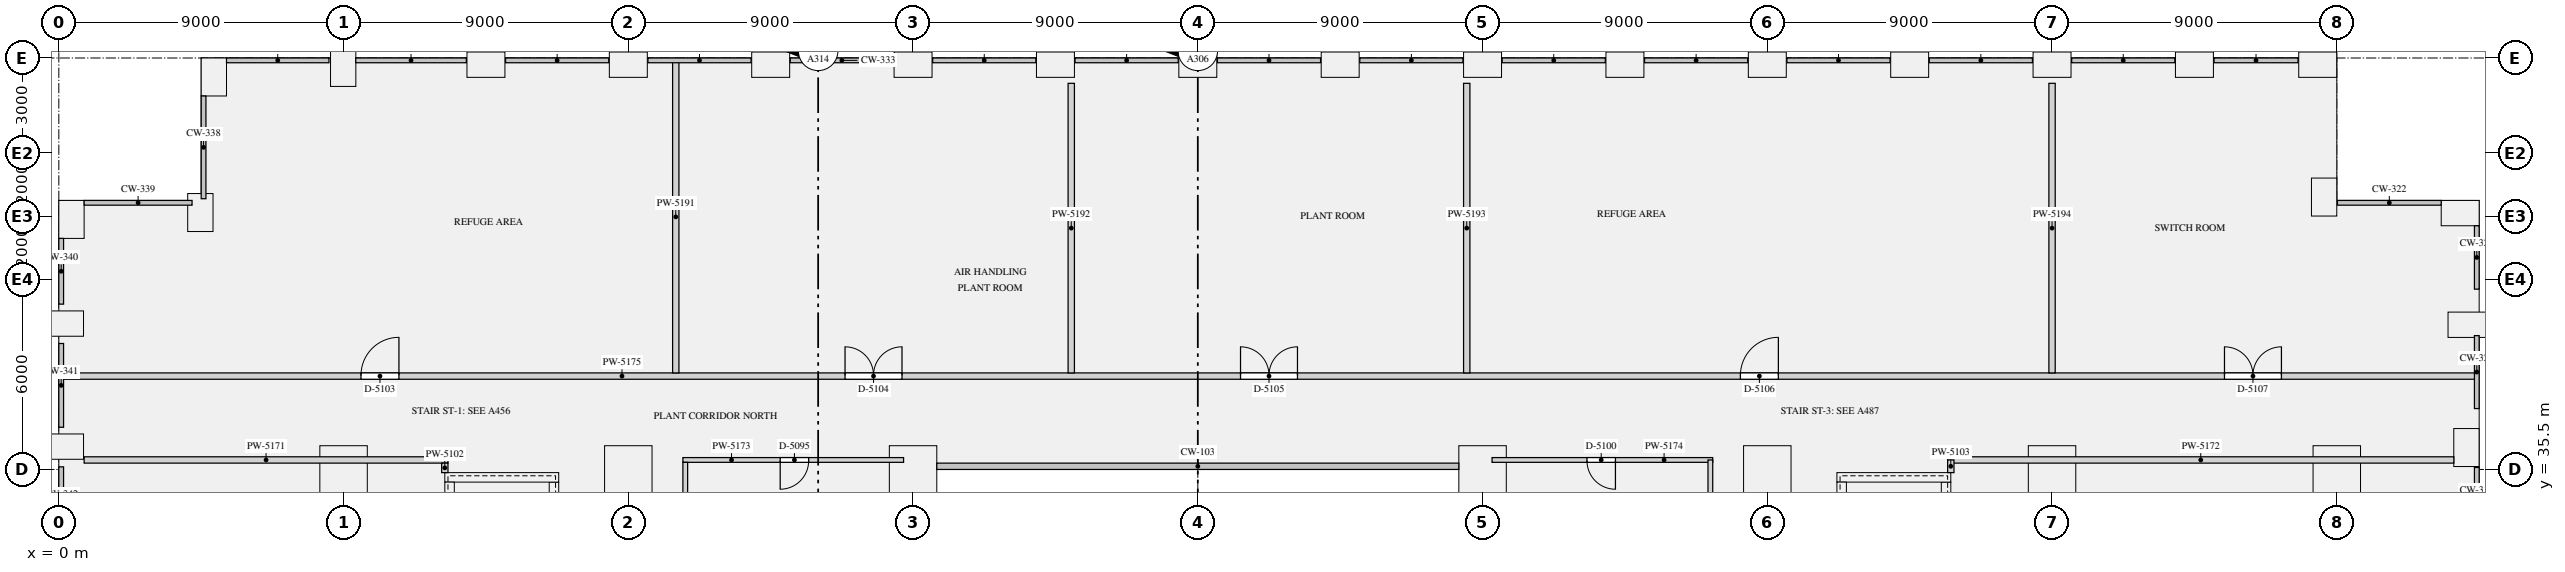
"""IFC4 building model, lengths in metres.
Left out: names, types, materials, properties, quantities, classifications, styles, units other than length and angle.
Written with IfcOpenShell. Run it as: python <this file> out.ifc"""

import sys

from ifc_helpers import new_model, si_unit, direction, frame, frame_2d, origin, origin_2d, place, context, subcontext, project, spatial, rectangle, extrude, element, fill, save


model = new_model("IFC4")
c1 = context("Model", 3, precision=1e-05, world=origin(), true_north=direction((0.0, 1.0)))
c2 = subcontext(c1, "Body", "Model", "MODEL_VIEW")
j1 = project(units=[si_unit("LENGTHUNIT", "METRE"), si_unit("PLANEANGLEUNIT", "RADIAN")], contexts=[c1])
p1 = place(None, origin())
s1 = spatial("IfcSite", under=j1, at=p1, CompositionType="ELEMENT")
p2 = place(p1, origin())
s2 = spatial("IfcBuilding", under=s1, at=p2, CompositionType="ELEMENT")
p3 = place(p2, frame((0.0, 0.0, 73.05)))
s3 = spatial("IfcBuildingStorey", under=s2, at=p3, CompositionType="ELEMENT", Elevation=73.05)
for number, where, z_axis, x_axis in (
    (1, (75.9, 43.6, 0.0), (0.0, 0.0, 1.0), (-1.0, 0.0, 0.0)),
    (2, (4.9, 47.9, 0.0), (0.0, 0.0, 1.0), (0.0, -1.0, 0.0)),
    (3, (0.4, 43.4, 0.0), (0.0, 0.0, 1.0), (0.0, -1.0, 0.0)),
):
    element("IfcColumn", number, at=place(p3, frame(where, z_axis=z_axis, x_axis=x_axis)), inside=s3, PredefinedType="USERDEFINED", context=c2, shape_type="SweptSolid", body=[
        extrude(rectangle(XDim=1.2, YDim=0.8, at=origin_2d()), origin(), (0.0, 0.0, 1.0), 4.16),
    ])
p4 = place(p3, frame((76.097, 36.192, -0.416), z_axis=(0.00592434117, 0.137487413096, 0.990485796678), x_axis=(-0.042640526386, -0.989567531264, 0.137614994017)))
e4 = element("IfcColumn", 4, at=p4, inside=s3, PredefinedType="USERDEFINED", context=c2, shape_type="SweptSolid", body=[
    extrude(rectangle(XDim=1.2, YDim=0.8, at=origin_2d()), origin(), (0.0, 0.0, 1.0), 4.574),
])
p5 = place(p3, frame((76.116, 40.072, -0.449), z_axis=(-0.03541334361, 0.118149875556, 0.992364097497), x_axis=(-0.957896811564, -0.287112692851, 0.0)))
e5 = element("IfcColumn", 5, at=p5, inside=s3, PredefinedType="USERDEFINED", context=c2, shape_type="SweptSolid", body=[
    extrude(rectangle(XDim=1.2, YDim=0.8, at=origin_2d()), origin(), (0.0, 0.0, 1.0), 4.633),
])
p6 = place(p3, frame((71.599, 44.107, -0.149), z_axis=(0.004819480051, -0.58126904247, 0.81369716288), x_axis=(-0.006746381053, 0.813669195202, 0.581289022021)))
e6 = element("IfcColumn", 6, at=p6, inside=s3, PredefinedType="USERDEFINED", context=c2, shape_type="SweptSolid", body=[
    extrude(rectangle(XDim=1.2, YDim=0.8, at=origin_2d()), origin(), (0.0, 0.0, 1.0), 4.914),
])
p7 = place(p3, frame((71.397, 48.289, -0.267), z_axis=(0.009740500049, -0.577983391799, 0.815990392997), x_axis=(0.999858025844, 0.016850167821, 0.0)))
e7 = element("IfcColumn", 7, at=p7, inside=s3, PredefinedType="USERDEFINED", context=c2, shape_type="SweptSolid", body=[
    extrude(rectangle(XDim=1.2, YDim=0.8, at=origin_2d()), origin(), (0.0, 0.0, 1.0), 5.188),
])
for number, where, z_axis, x_axis in (
    (8, (67.5, 48.289, -0.267), (0.0, -0.578, 0.816), (1.0, 0.0, 0.0)),
    (9, (63.0, 48.289, -0.267), (0.0, -0.578, 0.816), (1.0, 0.0, 0.0)),
    (10, (58.5, 48.289, -0.267), (0.0, -0.578, 0.816), (1.0, 0.0, 0.0)),
    (11, (54.0, 48.289, -0.267), (0.0, -0.578, 0.816), (1.0, 0.0, 0.0)),
    (12, (49.5, 48.289, -0.267), (0.0, -0.578, 0.816), (1.0, 0.0, 0.0)),
    (13, (45.0, 48.289, -0.267), (0.0, -0.578, 0.816), (1.0, 0.0, 0.0)),
    (14, (40.5, 48.289, -0.267), (0.0, -0.578, 0.816), (1.0, 0.0, 0.0)),
    (15, (36.0, 48.289, -0.267), (0.0, -0.578, 0.816), (1.0, 0.0, 0.0)),
    (16, (31.5, 48.289, -0.267), (0.0, -0.578, 0.816), (1.0, 0.0, 0.0)),
    (17, (27.0, 48.289, -0.267), (0.0, -0.578, 0.816), (1.0, 0.0, 0.0)),
    (18, (22.5, 48.289, -0.267), (0.0, -0.578, 0.816), (1.0, 0.0, 0.0)),
    (19, (18.0, 48.289, -0.267), (0.0, -0.578, 0.816), (1.0, 0.0, 0.0)),
    (20, (13.5, 48.289, -0.267), (0.0, -0.578, 0.816), (1.0, 0.0, 0.0)),
):
    element("IfcColumn", number, at=place(p3, frame(where, z_axis=z_axis, x_axis=x_axis)), inside=s3, PredefinedType="USERDEFINED", context=c2, shape_type="SweptSolid", body=[
        extrude(rectangle(XDim=1.2, YDim=0.8, at=origin_2d()), origin(), (0.0, 0.0, 1.0), 5.188),
    ])
p8 = place(p3, frame((8.988, 48.202, -0.136), z_axis=(0.071249140855, -0.598482976001, 0.79796095604), x_axis=(-0.094330794696, 0.792365691166, 0.602709144311)))
e21 = element("IfcColumn", 21, at=p8, inside=s3, PredefinedType="USERDEFINED", context=c2, shape_type="SweptSolid", body=[
    extrude(rectangle(XDim=1.2, YDim=0.8, at=origin_2d()), origin(), (0.0, 0.0, 1.0), 4.979),
])
p9 = place(p3, frame((4.474, 43.617, -0.025), z_axis=(0.658200154177, -0.435132989545, 0.614354814787), x_axis=(-0.512488108257, 0.338803449432, 0.789029886347)))
e22 = element("IfcColumn", 22, at=p9, inside=s3, PredefinedType="USERDEFINED", context=c2, shape_type="SweptSolid", body=[
    extrude(rectangle(XDim=1.2, YDim=0.8, at=origin_2d()), origin(), (0.0, 0.0, 1.0), 6.103),
])
p10 = place(p3, frame((0.18, 40.109, -0.206), z_axis=(0.72813978941, 0.052867833813, 0.683386742062), x_axis=(-0.072416080757, 0.997374509022, 0.0)))
e23 = element("IfcColumn", 23, at=p10, inside=s3, PredefinedType="USERDEFINED", context=c2, shape_type="SweptSolid", body=[
    extrude(rectangle(XDim=1.2, YDim=0.8, at=origin_2d()), origin(), (0.0, 0.0, 1.0), 6.017),
])
p11 = place(p3, frame((0.181, 36.221, -0.205), z_axis=(0.725881351267, 0.094569334257, 0.681287681454), x_axis=(-0.129190295435, 0.991619820075, 0.0)))
e24 = element("IfcColumn", 24, at=p11, inside=s3, PredefinedType="USERDEFINED", context=c2, shape_type="SweptSolid", body=[
    extrude(rectangle(XDim=1.2, YDim=0.8, at=origin_2d()), origin(), (0.0, 0.0, 1.0), 6.033),
])
for number, where, z_axis, x_axis in (
    (25, (9.0, 35.5, 0.0), (0.0, 0.0, 1.0), (1.0, 0.0, 0.0)),
    (26, (18.0, 35.5, 0.0), (0.0, 0.0, 1.0), (1.0, 0.0, 0.0)),
    (27, (27.0, 35.5, 0.0), (0.0, 0.0, 1.0), (1.0, 0.0, 0.0)),
    (28, (45.0, 35.5, 0.0), (0.0, 0.0, 1.0), (1.0, 0.0, 0.0)),
    (29, (54.0, 35.5, 0.0), (0.0, 0.0, 1.0), (1.0, 0.0, 0.0)),
    (30, (63.0, 35.5, 0.0), (0.0, 0.0, 1.0), (1.0, 0.0, 0.0)),
    (31, (72.0, 35.5, 0.0), (0.0, 0.0, 1.0), (1.0, 0.0, 0.0)),
):
    element("IfcColumn", number, at=place(p3, frame(where, z_axis=z_axis, x_axis=x_axis)), inside=s3, PredefinedType="COLUMN", context=c2, shape_type="SweptSolid", body=[
        extrude(rectangle(XDim=1.5, YDim=1.5, at=origin_2d()), origin(), (0.0, 0.0, 1.0), 4.2),
    ])
p12 = place(p3, frame((12.2, 35.25, 0.0), z_axis=(0.0, 0.0, 1.0), x_axis=(1.0, 0.0, 0.0)))
e32 = element("IfcWall", 32, at=p12, inside=s3, PredefinedType="SHEAR", context=c2, shape_type="SweptSolid", body=[
    extrude(rectangle(XDim=3.6, YDim=0.3, at=frame_2d((1.8, 0.0))), origin(), (0.0, 0.0, 1.0), 4.2),
])
for number, where, z_axis, x_axis in (
    (33, (12.35, 27.3, 0.0), (0.0, 0.0, 1.0), (0.0, 1.0, 0.0)),
    (34, (15.65, 27.3, 0.0), (0.0, 0.0, 1.0), (0.0, 1.0, 0.0)),
):
    element("IfcWall", number, at=place(p3, frame(where, z_axis=z_axis, x_axis=x_axis)), inside=s3, PredefinedType="SHEAR", context=c2, shape_type="SweptSolid", body=[
        extrude(rectangle(XDim=7.8, YDim=0.3, at=frame_2d((3.9, 0.0))), origin(), (0.0, 0.0, 1.0), 4.2),
    ])
p13 = place(p3, frame((56.2, 35.25, 0.0), z_axis=(0.0, 0.0, 1.0), x_axis=(1.0, 0.0, 0.0)))
e35 = element("IfcWall", 35, at=p13, inside=s3, PredefinedType="SHEAR", context=c2, shape_type="SweptSolid", body=[
    extrude(rectangle(XDim=3.6, YDim=0.3, at=frame_2d((1.8, 0.0))), origin(), (0.0, 0.0, 1.0), 4.2),
])
for number, where, z_axis, x_axis in (
    (36, (56.35, 27.3, 0.0), (0.0, 0.0, 1.0), (0.0, 1.0, 0.0)),
    (37, (59.65, 27.3, 0.0), (0.0, 0.0, 1.0), (0.0, 1.0, 0.0)),
):
    element("IfcWall", number, at=place(p3, frame(where, z_axis=z_axis, x_axis=x_axis)), inside=s3, PredefinedType="SHEAR", context=c2, shape_type="SweptSolid", body=[
        extrude(rectangle(XDim=7.8, YDim=0.3, at=frame_2d((3.9, 0.0))), origin(), (0.0, 0.0, 1.0), 4.2),
    ])
p14 = place(p3, frame((0.8, 35.8, 0.0), z_axis=(0.0, 0.0, 1.0), x_axis=(1.0, 0.0, 0.0)))
e38 = element("IfcWall", 38, at=p14, inside=s3, PredefinedType="PARTITIONING", context=c2, shape_type="SweptSolid", body=[
    extrude(rectangle(XDim=11.5, YDim=0.2, at=frame_2d((5.75, 0.0))), origin(), (0.0, 0.0, 1.0), 3.7),
])
p15 = place(p3, frame((59.7, 35.8, 0.0), z_axis=(0.0, 0.0, 1.0), x_axis=(1.0, 0.0, 0.0)))
e39 = element("IfcWall", 39, at=p15, inside=s3, PredefinedType="PARTITIONING", context=c2, shape_type="SweptSolid", body=[
    extrude(rectangle(XDim=16.0, YDim=0.2, at=frame_2d((8.0, 0.0))), origin(), (0.0, 0.0, 1.0), 3.7),
])
p16 = place(p3, frame((19.725, 35.8, 0.0), z_axis=(0.0, 0.0, 1.0), x_axis=(1.0, 0.0, 0.0)))
e40 = element("IfcWall", 40, at=p16, inside=s3, PredefinedType="PARTITIONING", context=c2, shape_type="SweptSolid", body=[
    extrude(rectangle(XDim=6.975, YDim=0.15, at=frame_2d((3.487, 0.0))), origin(), (0.0, 0.0, 1.0), 3.7),
])
p17 = place(p16, frame((3.075, 0.0, 0.0)))
e41 = element("IfcOpeningElement", 41, at=p17, cuts=e40, PredefinedType="OPENING", context=c2, shape_type="SweptSolid", body=[
    extrude(rectangle(XDim=0.9, YDim=2.1, at=frame_2d((0.45, 1.05))), frame((0.0, 0.085, 0.0), z_axis=(0.0, -1.0, 0.0), x_axis=(1.0, 0.0, 0.0)), (0.0, 0.0, 1.0), 0.17),
])
p18 = place(p3, frame((45.3, 35.8, 0.0), z_axis=(0.0, 0.0, 1.0), x_axis=(1.0, 0.0, 0.0)))
e42 = element("IfcWall", 42, at=p18, inside=s3, PredefinedType="PARTITIONING", context=c2, shape_type="SweptSolid", body=[
    extrude(rectangle(XDim=6.975, YDim=0.15, at=frame_2d((3.487, 0.0))), origin(), (0.0, 0.0, 1.0), 3.7),
])
p19 = place(p18, frame((3.0, 0.0, 0.0)))
e43 = element("IfcOpeningElement", 43, at=p19, cuts=e42, PredefinedType="OPENING", context=c2, shape_type="SweptSolid", body=[
    extrude(rectangle(XDim=0.9, YDim=2.1, at=frame_2d((0.45, 1.05))), frame((0.0, 0.085, 0.0), z_axis=(0.0, -1.0, 0.0), x_axis=(1.0, 0.0, 0.0)), (0.0, 0.0, 1.0), 0.17),
])
p20 = place(p3, frame((0.09, 38.45, 0.0), z_axis=(0.0, 0.0, 1.0), x_axis=(1.0, 0.0, 0.0)))
e44 = element("IfcWall", 44, at=p20, inside=s3, PredefinedType="PARTITIONING", context=c2, shape_type="SweptSolid", body=[
    extrude(rectangle(XDim=76.32, YDim=0.2, at=frame_2d((38.16, 0.0))), origin(), (0.0, 0.0, 1.0), 3.7),
])
p21 = place(p20, frame((9.46, 0.0, 0.0)))
e45 = element("IfcOpeningElement", 45, at=p21, cuts=e44, PredefinedType="OPENING", context=c2, shape_type="SweptSolid", body=[
    extrude(rectangle(XDim=1.2, YDim=2.1, at=frame_2d((0.6, 1.05))), frame((0.0, 0.11, 0.0), z_axis=(0.0, -1.0, 0.0), x_axis=(1.0, 0.0, 0.0)), (0.0, 0.0, 1.0), 0.22),
])
p22 = place(p20, frame((24.76, 0.0, 0.0)))
e46 = element("IfcOpeningElement", 46, at=p22, cuts=e44, PredefinedType="OPENING", context=c2, shape_type="SweptSolid", body=[
    extrude(rectangle(XDim=1.8, YDim=2.1, at=frame_2d((0.9, 1.05))), frame((0.0, 0.11, 0.0), z_axis=(0.0, -1.0, 0.0), x_axis=(1.0, 0.0, 0.0)), (0.0, 0.0, 1.0), 0.22),
])
p23 = place(p20, frame((37.26, 0.0, 0.0)))
e47 = element("IfcOpeningElement", 47, at=p23, cuts=e44, PredefinedType="OPENING", context=c2, shape_type="SweptSolid", body=[
    extrude(rectangle(XDim=1.8, YDim=2.1, at=frame_2d((0.9, 1.05))), frame((0.0, 0.11, 0.0), z_axis=(0.0, -1.0, 0.0), x_axis=(1.0, 0.0, 0.0)), (0.0, 0.0, 1.0), 0.22),
])
p24 = place(p20, frame((53.06, 0.0, 0.0)))
e48 = element("IfcOpeningElement", 48, at=p24, cuts=e44, PredefinedType="OPENING", context=c2, shape_type="SweptSolid", body=[
    extrude(rectangle(XDim=1.2, YDim=2.1, at=frame_2d((0.6, 1.05))), frame((0.0, 0.11, 0.0), z_axis=(0.0, -1.0, 0.0), x_axis=(1.0, 0.0, 0.0)), (0.0, 0.0, 1.0), 0.22),
])
p25 = place(p20, frame((68.36, 0.0, 0.0)))
e49 = element("IfcOpeningElement", 49, at=p25, cuts=e44, PredefinedType="OPENING", context=c2, shape_type="SweptSolid", body=[
    extrude(rectangle(XDim=1.8, YDim=2.1, at=frame_2d((0.9, 1.05))), frame((0.0, 0.11, 0.0), z_axis=(0.0, -1.0, 0.0), x_axis=(1.0, 0.0, 0.0)), (0.0, 0.0, 1.0), 0.22),
])
p26 = place(p3, frame((19.8, 31.075, 0.0), z_axis=(0.0, 0.0, 1.0), x_axis=(0.0, 1.0, 0.0)))
e50 = element("IfcWall", 50, at=p26, inside=s3, PredefinedType="PARTITIONING", context=c2, shape_type="SweptSolid", body=[
    extrude(rectangle(XDim=4.65, YDim=0.15, at=frame_2d((2.325, 0.0))), origin(), (0.0, 0.0, 1.0), 3.7),
])
p27 = place(p3, frame((52.2, 31.5, 0.0), z_axis=(0.0, 0.0, 1.0), x_axis=(0.0, 1.0, 0.0)))
e51 = element("IfcWall", 51, at=p27, inside=s3, PredefinedType="PARTITIONING", context=c2, shape_type="SweptSolid", body=[
    extrude(rectangle(XDim=4.3, YDim=0.15, at=frame_2d((2.15, 0.0))), origin(), (0.0, 0.0, 1.0), 3.7),
])
p28 = place(p3, frame((12.2, 35.4, 0.0), z_axis=(0.0, 0.0, 1.0), x_axis=(0.0, 1.0, 0.0)))
e52 = element("IfcWall", 52, at=p28, inside=s3, PredefinedType="PARTITIONING", context=c2, shape_type="SweptSolid", body=[
    extrude(rectangle(XDim=0.3, YDim=0.2, at=frame_2d((0.15, 0.0))), origin(), (0.0, 0.0, 1.0), 3.7),
])
p29 = place(p3, frame((59.8, 35.4, 0.0), z_axis=(0.0, 0.0, 1.0), x_axis=(0.0, 1.0, 0.0)))
e53 = element("IfcWall", 53, at=p29, inside=s3, PredefinedType="PARTITIONING", context=c2, shape_type="SweptSolid", body=[
    extrude(rectangle(XDim=0.4, YDim=0.2, at=frame_2d((0.2, 0.0))), origin(), (0.0, 0.0, 1.0), 3.7),
])
p30 = place(p3, frame((19.5, 38.55, 0.0), z_axis=(0.0, 0.0, 1.0), x_axis=(0.0, 1.0, 0.0)))
e54 = element("IfcWall", 54, at=p30, inside=s3, PredefinedType="PARTITIONING", context=c2, shape_type="SweptSolid", body=[
    extrude(rectangle(XDim=9.86, YDim=0.2, at=frame_2d((4.93, 0.0))), origin(), (0.0, 0.0, 1.0), 3.7),
])
for number, where, z_axis, x_axis in (
    (55, (32.0, 38.55, 0.0), (0.0, 0.0, 1.0), (0.0, 1.0, 0.0)),
    (56, (44.5, 38.55, 0.0), (0.0, 0.0, 1.0), (0.0, 1.0, 0.0)),
    (57, (63.0, 38.55, 0.0), (0.0, 0.0, 1.0), (0.0, 1.0, 0.0)),
):
    element("IfcWall", number, at=place(p3, frame(where, z_axis=z_axis, x_axis=x_axis)), inside=s3, PredefinedType="PARTITIONING", context=c2, shape_type="SweptSolid", body=[
        extrude(rectangle(XDim=9.15, YDim=0.2, at=frame_2d((4.575, 0.0))), origin(), (0.0, 0.0, 1.0), 3.7),
    ])
p31 = place(p17, frame((0.9, 0.0, 0.0), z_axis=(0.0, 0.0, 1.0), x_axis=(-1.0, 0.0, 0.0)))
e58 = element("IfcDoor", 58, at=p31, inside=s3, OperationType="SINGLE_SWING_RIGHT", PredefinedType="DOOR", context=c2, shape_type="SweptSolid", body=[
    extrude(rectangle(XDim=0.9, YDim=2.1, at=frame_2d((0.45, 1.05))), frame((0.0, 0.025, 0.0), z_axis=(0.0, -1.0, 0.0), x_axis=(1.0, 0.0, 0.0)), (0.0, 0.0, 1.0), 0.05),
])
fill(e41, e58)
p32 = place(p19, frame((0.9, 0.0, 0.0), z_axis=(0.0, 0.0, 1.0), x_axis=(-1.0, 0.0, 0.0)))
e59 = element("IfcDoor", 59, at=p32, inside=s3, OperationType="SINGLE_SWING_LEFT", PredefinedType="DOOR", context=c2, shape_type="SweptSolid", body=[
    extrude(rectangle(XDim=0.9, YDim=2.1, at=frame_2d((0.45, 1.05))), frame((0.0, 0.025, 0.0), z_axis=(0.0, -1.0, 0.0), x_axis=(1.0, 0.0, 0.0)), (0.0, 0.0, 1.0), 0.05),
])
fill(e43, e59)
p33 = place(p21, origin())
e60 = element("IfcDoor", 60, at=p33, inside=s3, OperationType="SINGLE_SWING_RIGHT", PredefinedType="DOOR", context=c2, shape_type="SweptSolid", body=[
    extrude(rectangle(XDim=1.2, YDim=2.1, at=frame_2d((0.6, 1.05))), frame((0.0, 0.025, 0.0), z_axis=(0.0, -1.0, 0.0), x_axis=(1.0, 0.0, 0.0)), (0.0, 0.0, 1.0), 0.05),
])
fill(e45, e60)
p34 = place(p22, origin())
e61 = element("IfcDoor", 61, at=p34, inside=s3, OperationType="DOUBLE_DOOR_SINGLE_SWING", PredefinedType="DOOR", context=c2, shape_type="SweptSolid", body=[
    extrude(rectangle(XDim=1.8, YDim=2.1, at=frame_2d((0.9, 1.05))), frame((0.0, 0.025, 0.0), z_axis=(0.0, -1.0, 0.0), x_axis=(1.0, 0.0, 0.0)), (0.0, 0.0, 1.0), 0.05),
])
fill(e46, e61)
p35 = place(p23, origin())
e62 = element("IfcDoor", 62, at=p35, inside=s3, OperationType="DOUBLE_DOOR_SINGLE_SWING", PredefinedType="DOOR", context=c2, shape_type="SweptSolid", body=[
    extrude(rectangle(XDim=1.8, YDim=2.1, at=frame_2d((0.9, 1.05))), frame((0.0, 0.025, 0.0), z_axis=(0.0, -1.0, 0.0), x_axis=(1.0, 0.0, 0.0)), (0.0, 0.0, 1.0), 0.05),
])
fill(e47, e62)
p36 = place(p24, origin())
e63 = element("IfcDoor", 63, at=p36, inside=s3, OperationType="SINGLE_SWING_RIGHT", PredefinedType="DOOR", context=c2, shape_type="SweptSolid", body=[
    extrude(rectangle(XDim=1.2, YDim=2.1, at=frame_2d((0.6, 1.05))), frame((0.0, 0.025, 0.0), z_axis=(0.0, -1.0, 0.0), x_axis=(1.0, 0.0, 0.0)), (0.0, 0.0, 1.0), 0.05),
])
fill(e48, e63)
p37 = place(p25, origin())
e64 = element("IfcDoor", 64, at=p37, inside=s3, OperationType="DOUBLE_DOOR_SINGLE_SWING", PredefinedType="DOOR", context=c2, shape_type="SweptSolid", body=[
    extrude(rectangle(XDim=1.8, YDim=2.1, at=frame_2d((0.9, 1.05))), frame((0.0, 0.025, 0.0), z_axis=(0.0, -1.0, 0.0), x_axis=(1.0, 0.0, 0.0)), (0.0, 0.0, 1.0), 0.05),
])
fill(e49, e64)
save(model, sys.argv[1])
